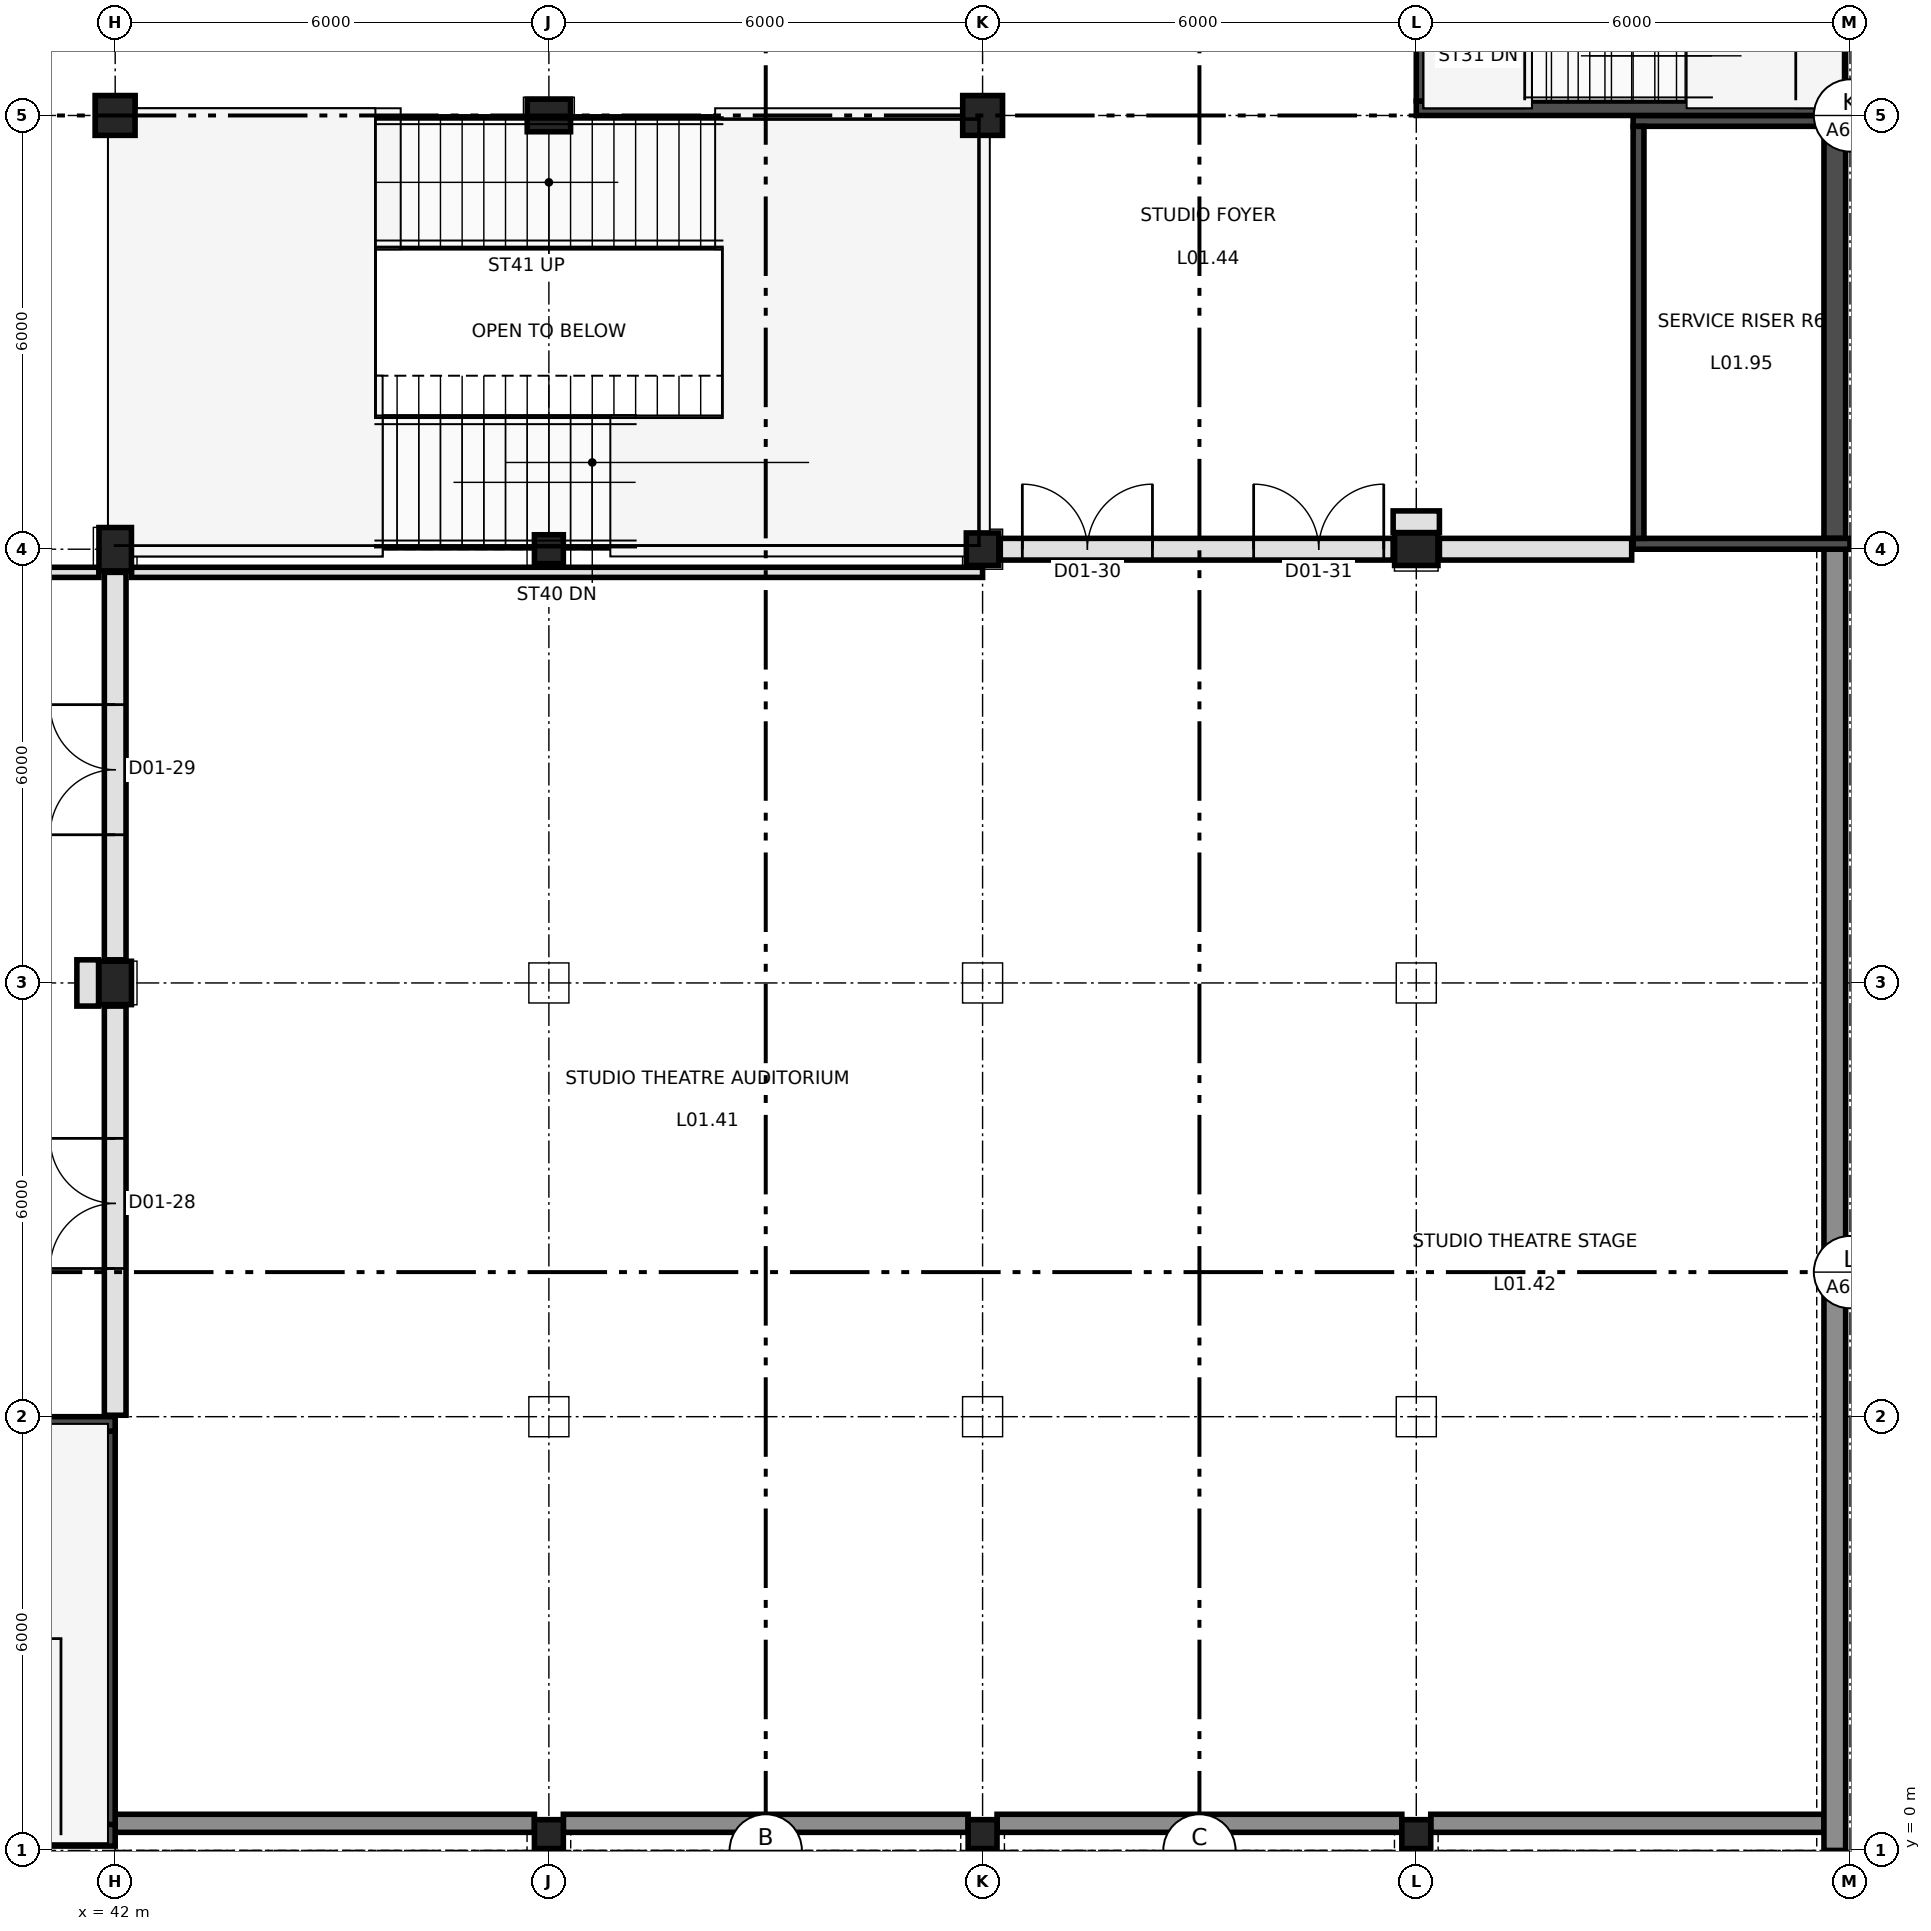
"""IFC4 building model, lengths in metres.
Left out: names, types, materials, properties, quantities, classifications, styles, units other than length and angle.
Written with IfcOpenShell. Run it as: python <this file> out.ifc"""

import sys

from ifc_helpers import new_model, si_unit, direction, frame, frame_2d, origin, origin_2d, place, context, subcontext, project, spatial, rectangle, extrude, element, fill, save


model = new_model("IFC4")
c1 = context("Model", 3, precision=1e-05, world=origin(), true_north=direction((0.0, 1.0)))
c2 = subcontext(c1, "Body", "Model", "MODEL_VIEW")
j1 = project(units=[si_unit("LENGTHUNIT", "METRE"), si_unit("PLANEANGLEUNIT", "RADIAN")], contexts=[c1])
p1 = place(None, origin())
s1 = spatial("IfcSite", under=j1, at=p1, CompositionType="ELEMENT")
p2 = place(p1, origin())
s2 = spatial("IfcBuilding", under=s1, at=p2, CompositionType="ELEMENT")
p3 = place(p2, frame((0.0, 0.0, 7.0)))
s3 = spatial("IfcBuildingStorey", under=s2, at=p3, CompositionType="ELEMENT", Elevation=7.0)
for number, where, z_axis, x_axis in (
    (1, (48.0, 0.226, 0.0), (0.0, 0.0, 1.0), (1.0, 0.0, 0.0)),
    (2, (54.0, 0.226, 0.0), (0.0, 0.0, 1.0), (1.0, 0.0, 0.0)),
    (3, (60.0, 0.226, 0.0), (0.0, 0.0, 1.0), (1.0, 0.0, 0.0)),
):
    element("IfcColumn", number, at=place(p3, frame(where, z_axis=z_axis, x_axis=x_axis)), inside=s3, PredefinedType="COLUMN", context=c2, shape_type="SweptSolid", body=[
        extrude(rectangle(XDim=0.4, YDim=0.4, at=origin_2d()), origin(), (0.0, 0.0, 1.0), 5.0),
    ])
for number, where, z_axis, x_axis in (
    (4, (42.0, 12.0, 0.0), (0.0, 0.0, 1.0), (1.0, 0.0, 0.0)),
    (5, (42.0, 18.0, 0.0), (0.0, 0.0, 1.0), (1.0, 0.0, 0.0)),
):
    element("IfcColumn", number, at=place(p3, frame(where, z_axis=z_axis, x_axis=x_axis)), inside=s3, PredefinedType="COLUMN", context=c2, shape_type="SweptSolid", body=[
        extrude(rectangle(XDim=0.45, YDim=0.6, at=origin_2d()), origin(), (0.0, 0.0, 1.0), 5.0),
    ])
p4 = place(p3, frame((48.0, 18.0, 0.0), z_axis=(0.0, 0.0, 1.0), x_axis=(1.0, 0.0, 0.0)))
e6 = element("IfcColumn", 6, at=p4, inside=s3, PredefinedType="COLUMN", context=c2, shape_type="SweptSolid", body=[
    extrude(rectangle(XDim=0.4, YDim=0.4, at=origin_2d()), origin(), (0.0, 0.0, 1.0), 5.0),
])
p5 = place(p3, frame((54.0, 18.0, 0.0), z_axis=(0.0, 0.0, 1.0), x_axis=(1.0, 0.0, 0.0)))
e7 = element("IfcColumn", 7, at=p5, inside=s3, PredefinedType="COLUMN", context=c2, shape_type="SweptSolid", body=[
    extrude(rectangle(XDim=0.45, YDim=0.45, at=origin_2d()), origin(), (0.0, 0.0, 1.0), 5.0),
])
p6 = place(p3, frame((60.0, 18.0, 0.0), z_axis=(0.0, 0.0, 1.0), x_axis=(1.0, 0.0, 0.0)))
e8 = element("IfcColumn", 8, at=p6, inside=s3, PredefinedType="COLUMN", context=c2, shape_type="SweptSolid", body=[
    extrude(rectangle(XDim=0.6, YDim=0.45, at=origin_2d()), origin(), (0.0, 0.0, 1.0), 5.0),
])
p7 = place(p3, frame((42.0, 24.0, 0.0), z_axis=(0.0, 0.0, 1.0), x_axis=(1.0, 0.0, 0.0)))
e9 = element("IfcColumn", 9, at=p7, inside=s3, PredefinedType="COLUMN", context=c2, shape_type="SweptSolid", body=[
    extrude(rectangle(XDim=0.55, YDim=0.55, at=origin_2d()), origin(), (0.0, 0.0, 1.0), 5.0),
])
p8 = place(p3, frame((48.0, 24.0, 0.0), z_axis=(0.0, 0.0, 1.0), x_axis=(1.0, 0.0, 0.0)))
e10 = element("IfcColumn", 10, at=p8, inside=s3, PredefinedType="COLUMN", context=c2, shape_type="SweptSolid", body=[
    extrude(rectangle(XDim=0.6, YDim=0.45, at=origin_2d()), origin(), (0.0, 0.0, 1.0), 5.0),
])
p9 = place(p3, frame((54.0, 24.0, 0.0), z_axis=(0.0, 0.0, 1.0), x_axis=(1.0, 0.0, 0.0)))
e11 = element("IfcColumn", 11, at=p9, inside=s3, PredefinedType="COLUMN", context=c2, shape_type="SweptSolid", body=[
    extrude(rectangle(XDim=0.55, YDim=0.55, at=origin_2d()), origin(), (0.0, 0.0, 1.0), 5.0),
])
p10 = place(p3, frame((36.0, 5.9, 0.0), z_axis=(0.0, 0.0, 1.0), x_axis=(1.0, 0.0, 0.0)))
e12 = element("IfcWall", 12, at=p10, inside=s3, PredefinedType="SHEAR", context=c2, shape_type="SweptSolid", body=[
    extrude(rectangle(XDim=6.0, YDim=0.2, at=frame_2d((3.0, 0.0))), origin(), (0.0, 0.0, 1.0), 5.0),
])
p11 = place(p10, frame((0.3, 0.0, 0.0)))
e13 = element("IfcOpeningElement", 13, at=p11, cuts=e12, PredefinedType="OPENING", context=c2, shape_type="SweptSolid", body=[
    extrude(rectangle(XDim=1.1, YDim=2.2, at=frame_2d((0.55, 1.1))), frame((0.0, 0.11, 0.0), z_axis=(0.0, -1.0, 0.0), x_axis=(1.0, 0.0, 0.0)), (0.0, 0.0, 1.0), 0.22),
])
p12 = place(p3, frame((36.0, 0.21, 0.0), z_axis=(0.0, 0.0, 1.0), x_axis=(1.0, 0.0, 0.0)))
e14 = element("IfcWall", 14, at=p12, inside=s3, PredefinedType="SHEAR", context=c2, shape_type="SweptSolid", body=[
    extrude(rectangle(XDim=6.0, YDim=0.3, at=frame_2d((3.0, 0.0))), origin(), (0.0, 0.0, 1.0), 5.0),
])
p13 = place(p3, frame((41.9, 0.3, 0.0), z_axis=(0.0, 0.0, 1.0), x_axis=(0.0, 1.0, 0.0)))
e15 = element("IfcWall", 15, at=p13, inside=s3, PredefinedType="SHEAR", context=c2, shape_type="SweptSolid", body=[
    extrude(rectangle(XDim=5.5, YDim=0.2, at=frame_2d((2.75, 0.0))), origin(), (0.0, 0.0, 1.0), 5.0),
])
p14 = place(p3, frame((60.0, 24.1, 0.0), z_axis=(0.0, 0.0, 1.0), x_axis=(1.0, 0.0, 0.0)))
e16 = element("IfcWall", 16, at=p14, inside=s3, PredefinedType="SHEAR", context=c2, shape_type="SweptSolid", body=[
    extrude(rectangle(XDim=6.0, YDim=0.2, at=frame_2d((3.0, 0.0))), origin(), (0.0, 0.0, 1.0), 5.0),
])
p15 = place(p3, frame((60.1, 24.2, 0.0), z_axis=(0.0, 0.0, 1.0), x_axis=(0.0, 1.0, 0.0)))
e17 = element("IfcWall", 17, at=p15, inside=s3, PredefinedType="SHEAR", context=c2, shape_type="SweptSolid", body=[
    extrude(rectangle(XDim=5.5, YDim=0.2, at=frame_2d((2.75, 0.0))), origin(), (0.0, 0.0, 1.0), 5.0),
])
p16 = place(p15, frame((1.9, 0.0, 0.0)))
e18 = element("IfcOpeningElement", 18, at=p16, cuts=e17, PredefinedType="OPENING", context=c2, shape_type="SweptSolid", body=[
    extrude(rectangle(XDim=1.8, YDim=2.2, at=frame_2d((0.9, 1.1))), frame((0.0, 0.11, 0.0), z_axis=(0.0, -1.0, 0.0), x_axis=(1.0, 0.0, 0.0)), (0.0, 0.0, 1.0), 0.22),
])
p17 = place(p3, frame((65.79, 24.2, 0.0), z_axis=(0.0, 0.0, 1.0), x_axis=(0.0, 1.0, 0.0)))
e19 = element("IfcWall", 19, at=p17, inside=s3, PredefinedType="SHEAR", context=c2, shape_type="SweptSolid", body=[
    extrude(rectangle(XDim=5.5, YDim=0.3, at=frame_2d((2.75, 0.0))), origin(), (0.0, 0.0, 1.0), 5.0),
])
for number, where, z_axis, x_axis in (
    (20, (63.0, 23.925, 0.0), (0.0, 0.0, 1.0), (1.0, 0.0, 0.0)),
    (21, (63.0, 18.075, 0.0), (0.0, 0.0, 1.0), (1.0, 0.0, 0.0)),
):
    element("IfcWall", number, at=place(p3, frame(where, z_axis=z_axis, x_axis=x_axis)), inside=s3, PredefinedType="SHEAR", context=c2, shape_type="SweptSolid", body=[
        extrude(rectangle(XDim=3.0, YDim=0.15, at=frame_2d((1.5, 0.0))), origin(), (0.0, 0.0, 1.0), 5.0),
    ])
p18 = place(p3, frame((63.075, 18.15, 0.0), z_axis=(0.0, 0.0, 1.0), x_axis=(0.0, 1.0, 0.0)))
e22 = element("IfcWall", 22, at=p18, inside=s3, PredefinedType="SHEAR", context=c2, shape_type="SweptSolid", body=[
    extrude(rectangle(XDim=5.7, YDim=0.15, at=frame_2d((2.85, 0.0))), origin(), (0.0, 0.0, 1.0), 5.0),
])
p19 = place(p3, frame((65.79, 18.15, 0.0), z_axis=(0.0, 0.0, 1.0), x_axis=(0.0, 1.0, 0.0)))
e23 = element("IfcWall", 23, at=p19, inside=s3, PredefinedType="SHEAR", context=c2, shape_type="SweptSolid", body=[
    extrude(rectangle(XDim=5.7, YDim=0.3, at=frame_2d((2.85, 0.0))), origin(), (0.0, 0.0, 1.0), 5.0),
])
p20 = place(p3, frame((65.79, 0.0, 0.0), z_axis=(0.0, 0.0, 1.0), x_axis=(0.0, 1.0, 0.0)))
e24 = element("IfcWall", 24, at=p20, inside=s3, PredefinedType="SOLIDWALL", context=c2, shape_type="SweptSolid", body=[
    extrude(rectangle(XDim=18.0, YDim=0.3, at=frame_2d((9.0, 0.0))), origin(), (0.0, 0.0, 1.0), 5.0),
])
p21 = place(p3, frame((65.64, 0.375, 0.0), z_axis=(0.0, 0.0, 1.0), x_axis=(-1.0, 0.0, 0.0)))
e25 = element("IfcWall", 25, at=p21, inside=s3, PredefinedType="SOLIDWALL", context=c2, shape_type="SweptSolid", body=[
    extrude(rectangle(XDim=5.44, YDim=0.25, at=frame_2d((2.72, 0.0))), origin(), (0.0, 0.0, 1.0), 9.5),
])
for number, where, z_axis, x_axis in (
    (26, (59.8, 0.375, 0.0), (0.0, 0.0, 1.0), (-1.0, 0.0, 0.0)),
    (27, (53.8, 0.375, 0.0), (0.0, 0.0, 1.0), (-1.0, 0.0, 0.0)),
):
    element("IfcWall", number, at=place(p3, frame(where, z_axis=z_axis, x_axis=x_axis)), inside=s3, PredefinedType="SOLIDWALL", context=c2, shape_type="SweptSolid", body=[
        extrude(rectangle(XDim=5.6, YDim=0.25, at=frame_2d((2.8, 0.0))), origin(), (0.0, 0.0, 1.0), 9.5),
    ])
p22 = place(p3, frame((47.8, 0.375, 0.0), z_axis=(0.0, 0.0, 1.0), x_axis=(-1.0, 0.0, 0.0)))
e28 = element("IfcWall", 28, at=p22, inside=s3, PredefinedType="SOLIDWALL", context=c2, shape_type="SweptSolid", body=[
    extrude(rectangle(XDim=5.8, YDim=0.25, at=frame_2d((2.9, 0.0))), origin(), (0.0, 0.0, 1.0), 9.5),
])
p23 = place(p3, frame((54.245, 18.0, 0.0), z_axis=(0.0, 0.0, 1.0), x_axis=(1.0, 0.0, 0.0)))
e29 = element("IfcWall", 29, at=p23, inside=s3, PredefinedType="PARTITIONING", context=c2, shape_type="SweptSolid", body=[
    extrude(rectangle(XDim=5.435, YDim=0.3, at=frame_2d((2.717, 0.0))), origin(), (0.0, 0.0, 1.0), 4.1),
])
p24 = place(p23, frame((0.305, 0.0, 0.0)))
e30 = element("IfcOpeningElement", 30, at=p24, cuts=e29, PredefinedType="OPENING", context=c2, shape_type="SweptSolid", body=[
    extrude(rectangle(XDim=1.8, YDim=2.1, at=frame_2d((0.9, 1.05))), frame((0.0, 0.16, 0.0), z_axis=(0.0, -1.0, 0.0), x_axis=(1.0, 0.0, 0.0)), (0.0, 0.0, 1.0), 0.32),
])
p25 = place(p23, frame((3.505, 0.0, 0.0)))
e31 = element("IfcOpeningElement", 31, at=p25, cuts=e29, PredefinedType="OPENING", context=c2, shape_type="SweptSolid", body=[
    extrude(rectangle(XDim=1.8, YDim=2.1, at=frame_2d((0.9, 1.05))), frame((0.0, 0.16, 0.0), z_axis=(0.0, -1.0, 0.0), x_axis=(1.0, 0.0, 0.0)), (0.0, 0.0, 1.0), 0.32),
])
p26 = place(p3, frame((60.32, 18.0, 0.0), z_axis=(0.0, 0.0, 1.0), x_axis=(1.0, 0.0, 0.0)))
e32 = element("IfcWall", 32, at=p26, inside=s3, PredefinedType="PARTITIONING", context=c2, shape_type="SweptSolid", body=[
    extrude(rectangle(XDim=2.66, YDim=0.3, at=frame_2d((1.33, 0.0))), origin(), (0.0, 0.0, 1.0), 4.1),
])
p27 = place(p3, frame((59.68, 18.38, 0.0), z_axis=(0.0, 0.0, 1.0), x_axis=(1.0, 0.0, 0.0)))
e33 = element("IfcWall", 33, at=p27, inside=s3, PredefinedType="PARTITIONING", context=c2, shape_type="SweptSolid", body=[
    extrude(rectangle(XDim=0.64, YDim=0.3, at=frame_2d((0.32, 0.0))), origin(), (0.0, 0.0, 1.0), 4.1),
])
p28 = place(p3, frame((42.0, 12.32, 0.0), z_axis=(0.0, 0.0, 1.0), x_axis=(0.0, 1.0, 0.0)))
e34 = element("IfcWall", 34, at=p28, inside=s3, PredefinedType="PARTITIONING", context=c2, shape_type="SweptSolid", body=[
    extrude(rectangle(XDim=5.36, YDim=0.3, at=frame_2d((2.68, 0.0))), origin(), (0.0, 0.0, 1.0), 4.1),
])
p29 = place(p28, frame((1.73, 0.0, 0.0)))
e35 = element("IfcOpeningElement", 35, at=p29, cuts=e34, PredefinedType="OPENING", context=c2, shape_type="SweptSolid", body=[
    extrude(rectangle(XDim=1.8, YDim=2.1, at=frame_2d((0.9, 1.05))), frame((0.0, 0.16, 0.0), z_axis=(0.0, -1.0, 0.0), x_axis=(1.0, 0.0, 0.0)), (0.0, 0.0, 1.0), 0.32),
])
p30 = place(p3, frame((42.0, 6.02, 0.0), z_axis=(0.0, 0.0, 1.0), x_axis=(0.0, 1.0, 0.0)))
e36 = element("IfcWall", 36, at=p30, inside=s3, PredefinedType="PARTITIONING", context=c2, shape_type="SweptSolid", body=[
    extrude(rectangle(XDim=5.66, YDim=0.3, at=frame_2d((2.83, 0.0))), origin(), (0.0, 0.0, 1.0), 4.1),
])
p31 = place(p30, frame((2.03, 0.0, 0.0)))
e37 = element("IfcOpeningElement", 37, at=p31, cuts=e36, PredefinedType="OPENING", context=c2, shape_type="SweptSolid", body=[
    extrude(rectangle(XDim=1.8, YDim=2.1, at=frame_2d((0.9, 1.05))), frame((0.0, 0.16, 0.0), z_axis=(0.0, -1.0, 0.0), x_axis=(1.0, 0.0, 0.0)), (0.0, 0.0, 1.0), 0.32),
])
p32 = place(p3, frame((41.62, 11.68, 0.0), z_axis=(0.0, 0.0, 1.0), x_axis=(0.0, 1.0, 0.0)))
e38 = element("IfcWall", 38, at=p32, inside=s3, PredefinedType="PARTITIONING", context=c2, shape_type="SweptSolid", body=[
    extrude(rectangle(XDim=0.64, YDim=0.3, at=frame_2d((0.32, 0.0))), origin(), (0.0, 0.0, 1.0), 4.1),
])
p33 = place(p3, frame((36.0, 17.68, 0.0), z_axis=(0.0, 0.0, 1.0), x_axis=(1.0, 0.0, 0.0)))
e39 = element("IfcWall", 39, at=p33, inside=s3, PredefinedType="PARTITIONING", context=c2, shape_type="SweptSolid", body=[
    extrude(rectangle(XDim=5.775, YDim=0.14, at=frame_2d((2.887, 0.0))), origin(), (0.0, 0.0, 1.0), 4.1),
])
p34 = place(p3, frame((42.225, 17.68, 0.0), z_axis=(0.0, 0.0, 1.0), x_axis=(1.0, 0.0, 0.0)))
e40 = element("IfcWall", 40, at=p34, inside=s3, PredefinedType="PARTITIONING", context=c2, shape_type="SweptSolid", body=[
    extrude(rectangle(XDim=11.775, YDim=0.14, at=frame_2d((5.887, 0.0))), origin(), (0.0, 0.0, 1.0), 5.0),
])
p35 = place(p31, origin())
e41 = element("IfcDoor", 41, at=p35, inside=s3, OperationType="DOUBLE_DOOR_SINGLE_SWING", PredefinedType="DOOR", context=c2, shape_type="SweptSolid", body=[
    extrude(rectangle(XDim=1.8, YDim=2.1, at=frame_2d((0.9, 1.05))), frame((0.0, 0.025, 0.0), z_axis=(0.0, -1.0, 0.0), x_axis=(1.0, 0.0, 0.0)), (0.0, 0.0, 1.0), 0.05),
])
fill(e37, e41)
p36 = place(p29, origin())
e42 = element("IfcDoor", 42, at=p36, inside=s3, OperationType="DOUBLE_DOOR_SINGLE_SWING", PredefinedType="DOOR", context=c2, shape_type="SweptSolid", body=[
    extrude(rectangle(XDim=1.8, YDim=2.1, at=frame_2d((0.9, 1.05))), frame((0.0, 0.025, 0.0), z_axis=(0.0, -1.0, 0.0), x_axis=(1.0, 0.0, 0.0)), (0.0, 0.0, 1.0), 0.05),
])
fill(e35, e42)
p37 = place(p24, origin())
e43 = element("IfcDoor", 43, at=p37, inside=s3, OperationType="DOUBLE_DOOR_SINGLE_SWING", PredefinedType="DOOR", context=c2, shape_type="SweptSolid", body=[
    extrude(rectangle(XDim=1.8, YDim=2.1, at=frame_2d((0.9, 1.05))), frame((0.0, 0.025, 0.0), z_axis=(0.0, -1.0, 0.0), x_axis=(1.0, 0.0, 0.0)), (0.0, 0.0, 1.0), 0.05),
])
fill(e30, e43)
p38 = place(p25, origin())
e44 = element("IfcDoor", 44, at=p38, inside=s3, OperationType="DOUBLE_DOOR_SINGLE_SWING", PredefinedType="DOOR", context=c2, shape_type="SweptSolid", body=[
    extrude(rectangle(XDim=1.8, YDim=2.1, at=frame_2d((0.9, 1.05))), frame((0.0, 0.025, 0.0), z_axis=(0.0, -1.0, 0.0), x_axis=(1.0, 0.0, 0.0)), (0.0, 0.0, 1.0), 0.05),
])
fill(e31, e44)
save(model, sys.argv[1])
